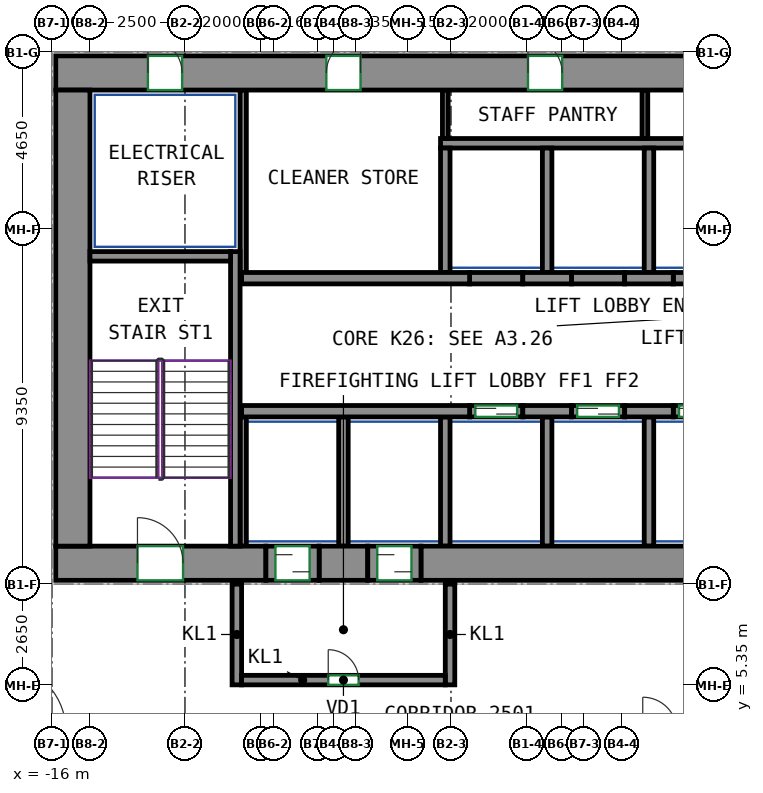
"""IFC4 building model, lengths in metres.
Left out: names, types, materials, properties, quantities, classifications, styles, units other than length and angle.
Written with IfcOpenShell. Run it as: python <this file> out.ifc"""

import sys

from ifc_helpers import new_model, si_unit, direction, frame, frame_2d, origin, place, context, subcontext, project, spatial, rectangle, extrude, source, transform, mapped, element, fill, save


model = new_model("IFC4")
c1 = context("Model", 3, precision=1e-05, world=origin(), true_north=direction((0.0, 1.0)))
c2 = subcontext(c1, "Body", "Model", "MODEL_VIEW")
j1 = project(units=[si_unit("LENGTHUNIT", "METRE"), si_unit("PLANEANGLEUNIT", "RADIAN")], contexts=[c1])
p1 = place(None, origin())
s1 = spatial("IfcSite", under=j1, at=p1, CompositionType="ELEMENT")
p2 = place(p1, origin())
s2 = spatial("IfcBuilding", under=s1, at=p2, CompositionType="ELEMENT")
p3 = place(p2, frame((0.0, 0.0, 108.6)))
s3 = spatial("IfcBuildingStorey", under=s2, at=p3, CompositionType="ELEMENT", Elevation=108.6)
m1 = source(origin(), c2, "Body", "SweptSolid", [
    extrude(rectangle(XDim=5.53, YDim=0.9, at=frame_2d((2.765, 0.0))), origin(), (0.0, 0.0, 1.0), 3.72),
])
p4 = place(p3, frame((-15.9, 8.55, 0.0), z_axis=(0.0, 0.0, 1.0), x_axis=(1.0, 0.0, 0.0)))
e1 = element("IfcWall", 1, at=p4, inside=s3, PredefinedType="SHEAR", context=c2, shape_type="MappedRepresentation", body=[
    mapped(m1, transform((0.0, 0.0, 0.0))),
])
p5 = place(p4, frame((2.15, 0.0, 0.0)))
e2 = element("IfcOpeningElement", 2, at=p5, cuts=e1, PredefinedType="OPENING", context=c2, shape_type="SweptSolid", body=[
    extrude(rectangle(XDim=1.2, YDim=2.1, at=frame_2d((0.6, 1.05))), frame((0.0, 0.46, 0.0), z_axis=(0.0, -1.0, 0.0), x_axis=(1.0, 0.0, 0.0)), (0.0, 0.0, 1.0), 0.92),
])
m2 = source(origin(), c2, "Body", "SweptSolid", [
    extrude(rectangle(XDim=1.28, YDim=0.9, at=frame_2d((0.64, 0.0))), origin(), (0.0, 0.0, 1.0), 3.72),
])
p6 = place(p3, frame((-8.97, 8.55, 0.0), z_axis=(0.0, 0.0, 1.0), x_axis=(1.0, 0.0, 0.0)))
e3 = element("IfcWall", 3, at=p6, inside=s3, PredefinedType="SHEAR", context=c2, shape_type="MappedRepresentation", body=[
    mapped(m2, transform((0.0, 0.0, 0.0))),
])
m3 = source(origin(), c2, "Body", "SweptSolid", [
    extrude(rectangle(XDim=14.18, YDim=0.9, at=frame_2d((7.09, 0.0))), origin(), (0.0, 0.0, 1.0), 3.72),
])
p7 = place(p3, frame((-6.29, 8.55, 0.0), z_axis=(0.0, 0.0, 1.0), x_axis=(1.0, 0.0, 0.0)))
e4 = element("IfcWall", 4, at=p7, inside=s3, PredefinedType="SHEAR", context=c2, shape_type="MappedRepresentation", body=[
    mapped(m3, transform((0.0, 0.0, 0.0))),
])
m4 = source(origin(), c2, "Body", "SweptSolid", [
    extrude(rectangle(XDim=33.9, YDim=0.9, at=frame_2d((16.95, 0.0))), origin(), (0.0, 0.0, 1.0), 3.72),
])
p8 = place(p3, frame((-15.9, 21.45, 0.0), z_axis=(0.0, 0.0, 1.0), x_axis=(1.0, 0.0, 0.0)))
e5 = element("IfcWall", 5, at=p8, inside=s3, PredefinedType="SHEAR", context=c2, shape_type="MappedRepresentation", body=[
    mapped(m4, transform((0.0, 0.0, 0.0))),
])
p9 = place(p8, frame((7.12, 0.0, 0.0)))
e6 = element("IfcOpeningElement", 6, at=p9, cuts=e5, PredefinedType="OPENING", context=c2, shape_type="SweptSolid", body=[
    extrude(rectangle(XDim=0.9, YDim=2.1, at=frame_2d((0.45, 1.05))), frame((0.0, 0.46, 0.0), z_axis=(0.0, -1.0, 0.0), x_axis=(1.0, 0.0, 0.0)), (0.0, 0.0, 1.0), 0.92),
])
p10 = place(p8, frame((12.427, 0.0, 0.0)))
e7 = element("IfcOpeningElement", 7, at=p10, cuts=e5, PredefinedType="OPENING", context=c2, shape_type="SweptSolid", body=[
    extrude(rectangle(XDim=0.9, YDim=2.1, at=frame_2d((0.45, 1.05))), frame((0.0, 0.46, 0.0), z_axis=(0.0, -1.0, 0.0), x_axis=(1.0, 0.0, 0.0)), (0.0, 0.0, 1.0), 0.92),
])
p11 = place(p8, frame((17.465, 0.0, 0.0)))
e8 = element("IfcOpeningElement", 8, at=p11, cuts=e5, PredefinedType="OPENING", context=c2, shape_type="SweptSolid", body=[
    extrude(rectangle(XDim=0.9, YDim=2.1, at=frame_2d((0.45, 1.05))), frame((0.0, 0.46, 0.0), z_axis=(0.0, -1.0, 0.0), x_axis=(1.0, 0.0, 0.0)), (0.0, 0.0, 1.0), 0.92),
])
p12 = place(p8, frame((21.686, 0.0, 0.0)))
e9 = element("IfcOpeningElement", 9, at=p12, cuts=e5, PredefinedType="OPENING", context=c2, shape_type="SweptSolid", body=[
    extrude(rectangle(XDim=0.9, YDim=2.1, at=frame_2d((0.45, 1.05))), frame((0.0, 0.46, 0.0), z_axis=(0.0, -1.0, 0.0), x_axis=(1.0, 0.0, 0.0)), (0.0, 0.0, 1.0), 0.92),
])
p13 = place(p8, frame((26.027, 0.0, 0.0)))
e10 = element("IfcOpeningElement", 10, at=p13, cuts=e5, PredefinedType="OPENING", context=c2, shape_type="SweptSolid", body=[
    extrude(rectangle(XDim=0.9, YDim=2.1, at=frame_2d((0.45, 1.05))), frame((0.0, 0.46, 0.0), z_axis=(0.0, -1.0, 0.0), x_axis=(1.0, 0.0, 0.0)), (0.0, 0.0, 1.0), 0.92),
])
p14 = place(p8, frame((2.425, 0.0, 0.0)))
e11 = element("IfcOpeningElement", 11, at=p14, cuts=e5, PredefinedType="OPENING", context=c2, shape_type="SweptSolid", body=[
    extrude(rectangle(XDim=0.9, YDim=2.1, at=frame_2d((0.45, 1.05))), frame((0.0, 0.46, 0.0), z_axis=(0.0, -1.0, 0.0), x_axis=(1.0, 0.0, 0.0)), (0.0, 0.0, 1.0), 0.92),
])
p15 = place(p8, frame((30.575, 0.0, 0.0)))
e12 = element("IfcOpeningElement", 12, at=p15, cuts=e5, PredefinedType="OPENING", context=c2, shape_type="SweptSolid", body=[
    extrude(rectangle(XDim=0.9, YDim=2.1, at=frame_2d((0.45, 1.05))), frame((0.0, 0.46, 0.0), z_axis=(0.0, -1.0, 0.0), x_axis=(1.0, 0.0, 0.0)), (0.0, 0.0, 1.0), 0.92),
])
m5 = source(origin(), c2, "Body", "SweptSolid", [
    extrude(rectangle(XDim=12.0, YDim=0.9, at=frame_2d((6.0, 0.0))), origin(), (0.0, 0.0, 1.0), 3.72),
])
p16 = place(p3, frame((-15.45, 9.0, 0.0), z_axis=(0.0, 0.0, 1.0), x_axis=(0.0, 1.0, 0.0)))
e13 = element("IfcWall", 13, at=p16, inside=s3, PredefinedType="SHEAR", context=c2, shape_type="MappedRepresentation", body=[
    mapped(m5, transform((0.0, 0.0, 0.0))),
])
m6 = source(origin(), c2, "Body", "SweptSolid", [
    extrude(rectangle(XDim=7.75, YDim=0.25, at=frame_2d((3.875, 0.0))), origin(), (0.0, 0.0, 1.0), 3.72),
])
p17 = place(p3, frame((-11.175, 9.0, 0.0), z_axis=(0.0, 0.0, 1.0), x_axis=(0.0, 1.0, 0.0)))
e14 = element("IfcWall", 14, at=p17, inside=s3, PredefinedType="SHEAR", context=c2, shape_type="MappedRepresentation", body=[
    mapped(m6, transform((0.0, 0.0, 0.0))),
])
m7 = source(origin(), c2, "Body", "SweptSolid", [
    extrude(rectangle(XDim=3.7, YDim=0.25, at=frame_2d((1.85, 0.0))), origin(), (0.0, 0.0, 1.0), 3.72),
])
p18 = place(p3, frame((-15.0, 16.625, 0.0), z_axis=(0.0, 0.0, 1.0), x_axis=(1.0, 0.0, 0.0)))
e15 = element("IfcWall", 15, at=p18, inside=s3, PredefinedType="SHEAR", context=c2, shape_type="MappedRepresentation", body=[
    mapped(m7, transform((0.0, 0.0, 0.0))),
])
m8 = source(origin(), c2, "Body", "SweptSolid", [
    extrude(rectangle(XDim=6.0, YDim=0.3, at=frame_2d((3.0, 0.0))), origin(), (0.0, 0.0, 1.0), 3.72),
])
p19 = place(p3, frame((-11.01, 12.55, 0.0), z_axis=(0.0, 0.0, 1.0), x_axis=(1.0, 0.0, 0.0)))
e16 = element("IfcWall", 16, at=p19, inside=s3, PredefinedType="SHEAR", context=c2, shape_type="MappedRepresentation", body=[
    mapped(m8, transform((0.0, 0.0, 0.0))),
])
m9 = source(origin(), c2, "Body", "SweptSolid", [
    extrude(rectangle(XDim=1.28, YDim=0.3, at=frame_2d((0.64, 0.0))), origin(), (0.0, 0.0, 1.0), 3.72),
])
for number, where, z_axis, x_axis in (
    (17, (-3.61, 12.55, 0.0), (0.0, 0.0, 1.0), (1.0, 0.0, 0.0)),
    (18, (-0.93, 12.55, 0.0), (0.0, 0.0, 1.0), (1.0, 0.0, 0.0)),
):
    element("IfcWall", number, at=place(p3, frame(where, z_axis=z_axis, x_axis=x_axis)), inside=s3, PredefinedType="SHEAR", context=c2, shape_type="MappedRepresentation", body=[
        mapped(m9, transform((0.0, 0.0, 0.0))),
    ])
p20 = place(p3, frame((-11.01, 16.05, 0.0), z_axis=(0.0, 0.0, 1.0), x_axis=(1.0, 0.0, 0.0)))
e19 = element("IfcWall", 19, at=p20, inside=s3, PredefinedType="SHEAR", context=c2, shape_type="MappedRepresentation", body=[
    mapped(m8, transform((0.0, 0.0, 0.0))),
])
for number, where, z_axis, x_axis in (
    (20, (-3.61, 16.05, 0.0), (0.0, 0.0, 1.0), (1.0, 0.0, 0.0)),
    (21, (-0.93, 16.05, 0.0), (0.0, 0.0, 1.0), (1.0, 0.0, 0.0)),
):
    element("IfcWall", number, at=place(p3, frame(where, z_axis=z_axis, x_axis=x_axis)), inside=s3, PredefinedType="SHEAR", context=c2, shape_type="MappedRepresentation", body=[
        mapped(m9, transform((0.0, 0.0, 0.0))),
    ])
m10 = source(origin(), c2, "Body", "SweptSolid", [
    extrude(rectangle(XDim=1.4, YDim=0.3, at=frame_2d((0.7, 0.0))), origin(), (0.0, 0.0, 1.0), 3.72),
])
p21 = place(p3, frame((-5.01, 12.55, 0.0), z_axis=(0.0, 0.0, 1.0), x_axis=(1.0, 0.0, 0.0)))
e22 = element("IfcWall", 22, at=p21, inside=s3, PredefinedType="PARTITIONING", context=c2, shape_type="MappedRepresentation", body=[
    mapped(m10, transform((0.0, 0.0, 0.0))),
])
p22 = place(p21, frame((0.15, 0.0, 0.0)))
e23 = element("IfcOpeningElement", 23, at=p22, cuts=e22, PredefinedType="OPENING", context=c2, shape_type="SweptSolid", body=[
    extrude(rectangle(XDim=1.1, YDim=2.1, at=frame_2d((0.55, 1.05))), frame((0.0, 0.16, 0.0), z_axis=(0.0, -1.0, 0.0), x_axis=(1.0, 0.0, 0.0)), (0.0, 0.0, 1.0), 0.32),
])
m11 = source(origin(), c2, "Body", "SweptSolid", [
    extrude(rectangle(XDim=1.4, YDim=0.3, at=frame_2d((0.7, 0.0))), origin(), (0.0, 0.0, 1.0), 3.72),
])
p23 = place(p3, frame((-2.33, 12.55, 0.0), z_axis=(0.0, 0.0, 1.0), x_axis=(1.0, 0.0, 0.0)))
e24 = element("IfcWall", 24, at=p23, inside=s3, PredefinedType="PARTITIONING", context=c2, shape_type="MappedRepresentation", body=[
    mapped(m11, transform((0.0, 0.0, 0.0))),
])
p24 = place(p23, frame((0.15, 0.0, 0.0)))
e25 = element("IfcOpeningElement", 25, at=p24, cuts=e24, PredefinedType="OPENING", context=c2, shape_type="SweptSolid", body=[
    extrude(rectangle(XDim=1.1, YDim=2.1, at=frame_2d((0.55, 1.05))), frame((0.0, 0.16, 0.0), z_axis=(0.0, -1.0, 0.0), x_axis=(1.0, 0.0, 0.0)), (0.0, 0.0, 1.0), 0.32),
])
p25 = place(p3, frame((0.35, 12.55, 0.0), z_axis=(0.0, 0.0, 1.0), x_axis=(1.0, 0.0, 0.0)))
e26 = element("IfcWall", 26, at=p25, inside=s3, PredefinedType="PARTITIONING", context=c2, shape_type="MappedRepresentation", body=[
    mapped(m10, transform((0.0, 0.0, 0.0))),
])
p26 = place(p25, frame((0.15, 0.0, 0.0)))
e27 = element("IfcOpeningElement", 27, at=p26, cuts=e26, PredefinedType="OPENING", context=c2, shape_type="SweptSolid", body=[
    extrude(rectangle(XDim=1.1, YDim=2.1, at=frame_2d((0.55, 1.05))), frame((0.0, 0.16, 0.0), z_axis=(0.0, -1.0, 0.0), x_axis=(1.0, 0.0, 0.0)), (0.0, 0.0, 1.0), 0.32),
])
p27 = place(p3, frame((-5.01, 16.05, 0.0), z_axis=(0.0, 0.0, 1.0), x_axis=(1.0, 0.0, 0.0)))
e28 = element("IfcWall", 28, at=p27, inside=s3, PredefinedType="PARTITIONING", context=c2, shape_type="MappedRepresentation", body=[
    mapped(m10, transform((0.0, 0.0, 0.0))),
])
p28 = place(p3, frame((-2.33, 16.05, 0.0), z_axis=(0.0, 0.0, 1.0), x_axis=(1.0, 0.0, 0.0)))
e29 = element("IfcWall", 29, at=p28, inside=s3, PredefinedType="PARTITIONING", context=c2, shape_type="MappedRepresentation", body=[
    mapped(m11, transform((0.0, 0.0, 0.0))),
])
p29 = place(p3, frame((0.35, 16.05, 0.0), z_axis=(0.0, 0.0, 1.0), x_axis=(1.0, 0.0, 0.0)))
e30 = element("IfcWall", 30, at=p29, inside=s3, PredefinedType="PARTITIONING", context=c2, shape_type="MappedRepresentation", body=[
    mapped(m10, transform((0.0, 0.0, 0.0))),
])
m12 = source(origin(), c2, "Body", "SweptSolid", [
    extrude(rectangle(XDim=2.65, YDim=0.25, at=frame_2d((1.325, 0.0))), origin(), (0.0, 0.0, 1.0), 3.72),
])
for number, where, z_axis, x_axis in (
    (31, (-11.135, 5.35, 0.0), (0.0, 0.0, 1.0), (0.0, 1.0, 0.0)),
    (32, (-5.525, 5.35, 0.0), (0.0, 0.0, 1.0), (0.0, 1.0, 0.0)),
):
    element("IfcWall", number, at=place(p3, frame(where, z_axis=z_axis, x_axis=x_axis)), inside=s3, PredefinedType="PARTITIONING", context=c2, shape_type="MappedRepresentation", body=[
        mapped(m12, transform((0.0, 0.0, 0.0))),
    ])
m13 = source(origin(), c2, "Body", "SweptSolid", [
    extrude(rectangle(XDim=5.36, YDim=0.25, at=frame_2d((2.68, 0.0))), origin(), (0.0, 0.0, 1.0), 3.72),
])
p30 = place(p3, frame((-11.01, 5.475, 0.0), z_axis=(0.0, 0.0, 1.0), x_axis=(1.0, 0.0, 0.0)))
e33 = element("IfcWall", 33, at=p30, inside=s3, PredefinedType="PARTITIONING", context=c2, shape_type="MappedRepresentation", body=[
    mapped(m13, transform((0.0, 0.0, 0.0))),
])
p31 = place(p30, frame((2.28, 0.0, 0.0)))
e34 = element("IfcOpeningElement", 34, at=p31, cuts=e33, PredefinedType="OPENING", context=c2, shape_type="SweptSolid", body=[
    extrude(rectangle(XDim=0.8, YDim=2.0, at=frame_2d((0.4, 1.0))), frame((0.0, 0.135, 0.0), z_axis=(0.0, -1.0, 0.0), x_axis=(1.0, 0.0, 0.0)), (0.0, 0.0, 1.0), 0.27),
])
m14 = source(origin(), c2, "Body", "SweptSolid", [
    extrude(rectangle(XDim=19.01, YDim=0.25, at=frame_2d((9.505, 0.0))), origin(), (0.0, 0.0, 1.0), 3.72),
])
p32 = place(p3, frame((-5.775, 19.6, 0.0), z_axis=(0.0, 0.0, 1.0), x_axis=(1.0, 0.0, 0.0)))
e35 = element("IfcWall", 35, at=p32, inside=s3, PredefinedType="PARTITIONING", context=c2, shape_type="MappedRepresentation", body=[
    mapped(m14, transform((0.0, 0.0, 0.0))),
])
m15 = source(origin(), c2, "Body", "SweptSolid", [
    extrude(rectangle(XDim=4.8, YDim=0.165, at=frame_2d((2.4, 0.0))), origin(), (0.0, 0.0, 1.0), 3.72),
])
p33 = place(p3, frame((-10.968, 16.2, 0.0), z_axis=(0.0, 0.0, 1.0), x_axis=(0.0, 1.0, 0.0)))
e36 = element("IfcWall", 36, at=p33, inside=s3, PredefinedType="PARTITIONING", context=c2, shape_type="MappedRepresentation", body=[
    mapped(m15, transform((0.0, 0.0, 0.0))),
])
m16 = source(origin(), c2, "Body", "SweptSolid", [
    extrude(rectangle(XDim=3.275, YDim=0.25, at=frame_2d((1.638, 0.0))), origin(), (0.0, 0.0, 1.0), 3.72),
])
for number, where, z_axis, x_axis in (
    (37, (-0.29, 16.2, 0.0), (0.0, 0.0, 1.0), (0.0, 1.0, 0.0)),
    (38, (-2.97, 16.2, 0.0), (0.0, 0.0, 1.0), (0.0, 1.0, 0.0)),
    (39, (-5.65, 16.2, 0.0), (0.0, 0.0, 1.0), (0.0, 1.0, 0.0)),
):
    element("IfcWall", number, at=place(p3, frame(where, z_axis=z_axis, x_axis=x_axis)), inside=s3, PredefinedType="PARTITIONING", context=c2, shape_type="MappedRepresentation", body=[
        mapped(m16, transform((0.0, 0.0, 0.0))),
    ])
m17 = source(origin(), c2, "Body", "SweptSolid", [
    extrude(rectangle(XDim=3.4, YDim=0.25, at=frame_2d((1.7, 0.0))), origin(), (0.0, 0.0, 1.0), 3.72),
])
p34 = place(p3, frame((-0.29, 9.0, 0.0), z_axis=(0.0, 0.0, 1.0), x_axis=(0.0, 1.0, 0.0)))
e40 = element("IfcWall", 40, at=p34, inside=s3, PredefinedType="PARTITIONING", context=c2, shape_type="MappedRepresentation", body=[
    mapped(m17, transform((0.0, 0.0, 0.0))),
])
m18 = source(origin(), c2, "Body", "SweptSolid", [
    extrude(rectangle(XDim=3.4, YDim=0.165, at=frame_2d((1.7, 0.0))), origin(), (0.0, 0.0, 1.0), 3.72),
])
p35 = place(p3, frame((-10.968, 9.0, 0.0), z_axis=(0.0, 0.0, 1.0), x_axis=(0.0, 1.0, 0.0)))
e41 = element("IfcWall", 41, at=p35, inside=s3, PredefinedType="PARTITIONING", context=c2, shape_type="MappedRepresentation", body=[
    mapped(m18, transform((0.0, 0.0, 0.0))),
])
for number, where, z_axis, x_axis in (
    (42, (-2.97, 9.0, 0.0), (0.0, 0.0, 1.0), (0.0, 1.0, 0.0)),
    (43, (-5.65, 9.0, 0.0), (0.0, 0.0, 1.0), (0.0, 1.0, 0.0)),
    (44, (-8.33, 9.0, 0.0), (0.0, 0.0, 1.0), (0.0, 1.0, 0.0)),
):
    element("IfcWall", number, at=place(p3, frame(where, z_axis=z_axis, x_axis=x_axis)), inside=s3, PredefinedType="PARTITIONING", context=c2, shape_type="MappedRepresentation", body=[
        mapped(m17, transform((0.0, 0.0, 0.0))),
    ])
m19 = source(origin(), c2, "Body", "SweptSolid", [
    extrude(rectangle(XDim=1.275, YDim=0.15, at=frame_2d((0.637, 0.0))), origin(), (0.0, 0.0, 1.0), 3.72),
])
for number, where, z_axis, x_axis in (
    (45, (-5.65, 19.725, 0.0), (0.0, 0.0, 1.0), (0.0, 1.0, 0.0)),
    (46, (-0.397, 19.725, 0.0), (0.0, 0.0, 1.0), (0.0, 1.0, 0.0)),
):
    element("IfcWall", number, at=place(p3, frame(where, z_axis=z_axis, x_axis=x_axis)), inside=s3, PredefinedType="PARTITIONING", context=c2, shape_type="MappedRepresentation", body=[
        mapped(m19, transform((0.0, 0.0, 0.0))),
    ])
m20 = source(origin(), c2, "Body", "SweptSolid", [
    extrude(rectangle(XDim=1.4, YDim=0.9, at=frame_2d((0.7, 0.0))), origin(), (0.0, 0.0, 1.0), 2.7),
])
p36 = place(p3, frame((-10.37, 8.55, 0.0), z_axis=(0.0, 0.0, 1.0), x_axis=(1.0, 0.0, 0.0)))
e47 = element("IfcWall", 47, at=p36, inside=s3, PredefinedType="PARTITIONING", context=c2, shape_type="MappedRepresentation", body=[
    mapped(m20, transform((0.0, 0.0, 0.0))),
])
p37 = place(p36, frame((0.25, 0.0, 0.0)))
e48 = element("IfcOpeningElement", 48, at=p37, cuts=e47, PredefinedType="OPENING", context=c2, shape_type="SweptSolid", body=[
    extrude(rectangle(XDim=0.9, YDim=2.1, at=frame_2d((0.45, 1.05))), frame((0.0, 0.46, 0.0), z_axis=(0.0, -1.0, 0.0), x_axis=(1.0, 0.0, 0.0)), (0.0, 0.0, 1.0), 0.92),
])
m21 = source(origin(), c2, "Body", "SweptSolid", [
    extrude(rectangle(XDim=1.4, YDim=0.9, at=frame_2d((0.7, 0.0))), origin(), (0.0, 0.0, 1.0), 2.7),
])
p38 = place(p3, frame((-7.69, 8.55, 0.0), z_axis=(0.0, 0.0, 1.0), x_axis=(1.0, 0.0, 0.0)))
e49 = element("IfcWall", 49, at=p38, inside=s3, PredefinedType="PARTITIONING", context=c2, shape_type="MappedRepresentation", body=[
    mapped(m21, transform((0.0, 0.0, 0.0))),
])
p39 = place(p38, frame((0.25, 0.0, 0.0)))
e50 = element("IfcOpeningElement", 50, at=p39, cuts=e49, PredefinedType="OPENING", context=c2, shape_type="SweptSolid", body=[
    extrude(rectangle(XDim=0.9, YDim=2.1, at=frame_2d((0.45, 1.05))), frame((0.0, 0.46, 0.0), z_axis=(0.0, -1.0, 0.0), x_axis=(1.0, 0.0, 0.0)), (0.0, 0.0, 1.0), 0.92),
])
p40 = place(p31, origin())
e51 = element("IfcDoor", 51, at=p40, inside=s3, OperationType="SINGLE_SWING_LEFT", PredefinedType="DOOR", context=c2, shape_type="SweptSolid", body=[
    extrude(rectangle(XDim=0.8, YDim=2.0, at=frame_2d((0.4, 1.0))), frame((0.0, 0.025, 0.0), z_axis=(0.0, -1.0, 0.0), x_axis=(1.0, 0.0, 0.0)), (0.0, 0.0, 1.0), 0.05),
])
fill(e34, e51)
p41 = place(p37, origin())
e52 = element("IfcDoor", 52, at=p41, inside=s3, OperationType="SLIDING_TO_LEFT", PredefinedType="DOOR", context=c2, shape_type="SweptSolid", body=[
    extrude(rectangle(XDim=0.9, YDim=2.1, at=frame_2d((0.45, 1.05))), frame((0.0, 0.355, 0.0), z_axis=(0.0, -1.0, 0.0), x_axis=(1.0, 0.0, 0.0)), (0.0, 0.0, 1.0), 0.05),
])
fill(e48, e52)
p42 = place(p39, origin())
e53 = element("IfcDoor", 53, at=p42, inside=s3, OperationType="SLIDING_TO_RIGHT", PredefinedType="DOOR", context=c2, shape_type="SweptSolid", body=[
    extrude(rectangle(XDim=0.9, YDim=2.1, at=frame_2d((0.45, 1.05))), frame((0.0, 0.355, 0.0), z_axis=(0.0, -1.0, 0.0), x_axis=(1.0, 0.0, 0.0)), (0.0, 0.0, 1.0), 0.05),
])
fill(e50, e53)
p43 = place(p22, origin())
e54 = element("IfcDoor", 54, at=p43, inside=s3, OperationType="DOUBLE_DOOR_SLIDING", PredefinedType="DOOR", context=c2, shape_type="SweptSolid", body=[
    extrude(rectangle(XDim=1.1, YDim=2.1, at=frame_2d((0.55, 1.05))), frame((0.0, 0.025, 0.0), z_axis=(0.0, -1.0, 0.0), x_axis=(1.0, 0.0, 0.0)), (0.0, 0.0, 1.0), 0.05),
])
fill(e23, e54)
p44 = place(p24, origin())
e55 = element("IfcDoor", 55, at=p44, inside=s3, OperationType="DOUBLE_DOOR_SLIDING", PredefinedType="DOOR", context=c2, shape_type="SweptSolid", body=[
    extrude(rectangle(XDim=1.1, YDim=2.1, at=frame_2d((0.55, 1.05))), frame((0.0, 0.025, 0.0), z_axis=(0.0, -1.0, 0.0), x_axis=(1.0, 0.0, 0.0)), (0.0, 0.0, 1.0), 0.05),
])
fill(e25, e55)
p45 = place(p26, origin())
e56 = element("IfcDoor", 56, at=p45, inside=s3, OperationType="DOUBLE_DOOR_SLIDING", PredefinedType="DOOR", context=c2, shape_type="SweptSolid", body=[
    extrude(rectangle(XDim=1.1, YDim=2.1, at=frame_2d((0.55, 1.05))), frame((0.0, 0.025, 0.0), z_axis=(0.0, -1.0, 0.0), x_axis=(1.0, 0.0, 0.0)), (0.0, 0.0, 1.0), 0.05),
])
fill(e27, e56)
p46 = place(p9, origin())
e57 = element("IfcDoor", 57, at=p46, inside=s3, OperationType="SINGLE_SWING_RIGHT", PredefinedType="DOOR", context=c2, shape_type="SweptSolid", body=[
    extrude(rectangle(XDim=0.9, YDim=2.1, at=frame_2d((0.45, 1.05))), frame((0.0, -0.305, 0.0), z_axis=(0.0, -1.0, 0.0), x_axis=(1.0, 0.0, 0.0)), (0.0, 0.0, 1.0), 0.05),
])
fill(e6, e57)
p47 = place(p10, origin())
e58 = element("IfcDoor", 58, at=p47, inside=s3, OperationType="SINGLE_SWING_LEFT", PredefinedType="DOOR", context=c2, shape_type="SweptSolid", body=[
    extrude(rectangle(XDim=0.9, YDim=2.1, at=frame_2d((0.45, 1.05))), frame((0.0, -0.305, 0.0), z_axis=(0.0, -1.0, 0.0), x_axis=(1.0, 0.0, 0.0)), (0.0, 0.0, 1.0), 0.05),
])
fill(e7, e58)
p48 = place(p14, origin())
e59 = element("IfcDoor", 59, at=p48, inside=s3, OperationType="SINGLE_SWING_LEFT", PredefinedType="DOOR", context=c2, shape_type="SweptSolid", body=[
    extrude(rectangle(XDim=0.9, YDim=2.1, at=frame_2d((0.45, 1.05))), frame((0.0, -0.305, 0.0), z_axis=(0.0, -1.0, 0.0), x_axis=(1.0, 0.0, 0.0)), (0.0, 0.0, 1.0), 0.05),
])
fill(e11, e59)
p49 = place(p5, origin())
e60 = element("IfcDoor", 60, at=p49, inside=s3, OperationType="DOUBLE_DOOR_SINGLE_SWING", PredefinedType="DOOR", context=c2, shape_type="SweptSolid", body=[
    extrude(rectangle(XDim=1.2, YDim=2.1, at=frame_2d((0.6, 1.05))), frame((0.0, 0.355, 0.0), z_axis=(0.0, -1.0, 0.0), x_axis=(1.0, 0.0, 0.0)), (0.0, 0.0, 1.0), 0.05),
])
fill(e2, e60)
save(model, sys.argv[1])
